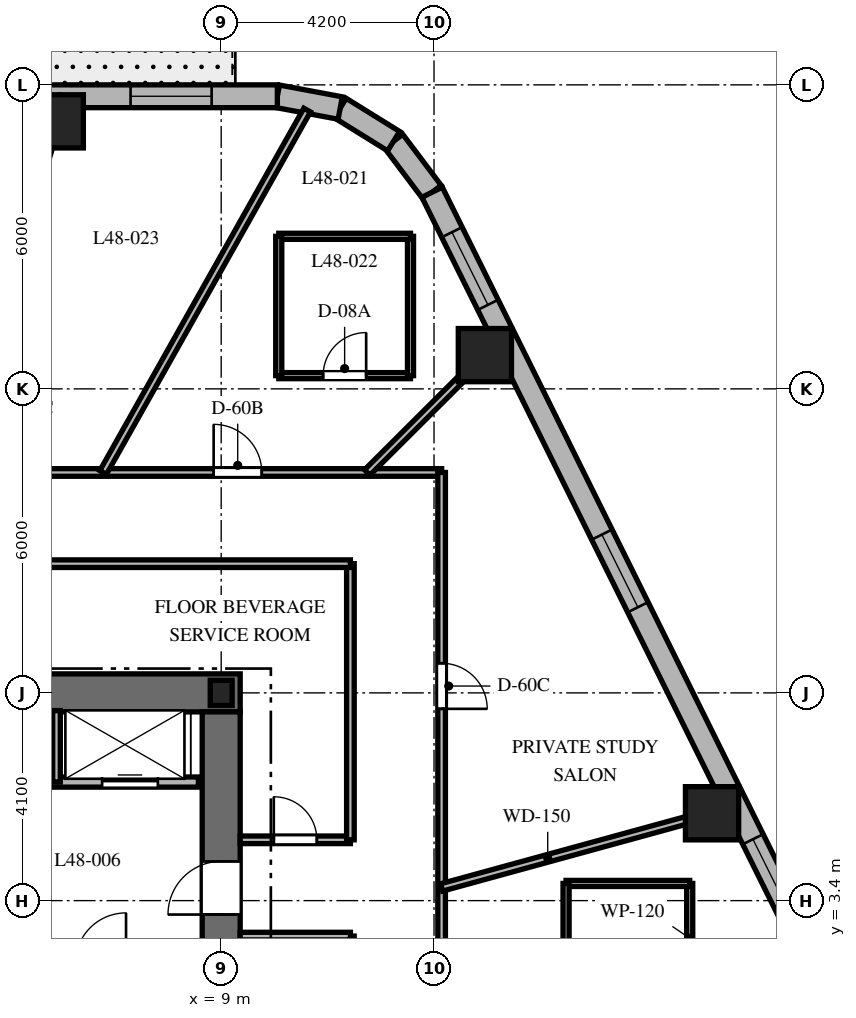
"""IFC4 building model, lengths in metres.
Left out: names, types, materials, properties, quantities, classifications, styles, units other than length and angle.
Written with IfcOpenShell. Run it as: python <this file> out.ifc"""

import sys

from ifc_helpers import new_model, si_unit, direction, frame, frame_2d, origin, origin_2d, place, context, subcontext, project, spatial, rectangle, i_section, extrude, element, fill, save


model = new_model("IFC4")
c1 = context("Model", 3, precision=1e-05, world=origin(), true_north=direction((0.0, 1.0)))
c2 = subcontext(c1, "Body", "Model", "MODEL_VIEW")
j1 = project(units=[si_unit("LENGTHUNIT", "METRE"), si_unit("PLANEANGLEUNIT", "RADIAN")], contexts=[c1])
p1 = place(None, origin())
s1 = spatial("IfcSite", under=j1, at=p1, CompositionType="ELEMENT")
p2 = place(p1, origin())
s2 = spatial("IfcBuilding", under=s1, at=p2, CompositionType="ELEMENT")
p3 = place(p2, frame((0.0, 0.0, 194.1)))
s3 = spatial("IfcBuildingStorey", under=s2, at=p3, CompositionType="ELEMENT", Elevation=194.1)
p4 = place(p3, frame((1.85, 7.5, 0.0), z_axis=(0.0, 0.0, 1.0), x_axis=(1.0, 0.0, 0.0)))
e1 = element("IfcWall", 1, at=p4, inside=s3, PredefinedType="SHEAR", context=c2, shape_type="SweptSolid", body=[
    extrude(rectangle(XDim=7.525, YDim=0.75, at=frame_2d((3.762, 0.0))), origin(), (0.0, 0.0, 1.0), 3.7),
])
p5 = place(p3, frame((9.0, -7.125, 0.0), z_axis=(0.0, 0.0, 1.0), x_axis=(0.0, 1.0, 0.0)))
e2 = element("IfcWall", 2, at=p5, inside=s3, PredefinedType="SHEAR", context=c2, shape_type="SweptSolid", body=[
    extrude(rectangle(XDim=14.25, YDim=0.75, at=frame_2d((7.125, 0.0))), origin(), (0.0, 0.0, 1.0), 3.7),
])
p6 = place(p5, frame((10.25, 0.0, 0.0)))
e3 = element("IfcOpeningElement", 3, at=p6, cuts=e2, PredefinedType="OPENING", context=c2, shape_type="SweptSolid", body=[
    extrude(rectangle(XDim=1.05, YDim=2.15, at=frame_2d((0.525, 1.075))), frame((0.0, 0.385, 0.0), z_axis=(0.0, -1.0, 0.0), x_axis=(1.0, 0.0, 0.0)), (0.0, 0.0, 1.0), 0.77),
])
p7 = place(p3, frame((9.0, 7.5, 0.0), z_axis=(0.0, 0.0, 1.0), x_axis=(1.0, 0.0, 0.0)))
e4 = element("IfcColumn", 4, at=p7, inside=s3, PredefinedType="COLUMN", context=c2, shape_type="SweptSolid", body=[
    extrude(i_section(OverallWidth=0.432, OverallDepth=0.498, WebThickness=0.056, FlangeThickness=0.089, at=origin_2d()), origin(), (0.0, 0.0, 1.0), 3.7),
])
for number, where, z_axis, x_axis in (
    (5, (18.687, 5.124, 0.0), (0.0, 0.0, 1.0), (1.0, 0.0, 0.0)),
    (6, (14.204, 14.166, 0.0), (0.0, 0.0, 1.0), (1.0, 0.0, 0.0)),
    (7, (5.755, 18.78, 0.0), (0.0, 0.0, 1.0), (1.0, 0.0, 0.0)),
):
    element("IfcColumn", number, at=place(p3, frame(where, z_axis=z_axis, x_axis=x_axis)), inside=s3, PredefinedType="COLUMN", context=c2, shape_type="SweptSolid", body=[
        extrude(rectangle(XDim=1.05, YDim=1.05, at=origin_2d()), origin(), (0.0, 0.0, 1.0), 3.7),
    ])
p8 = place(p3, frame((13.162, 17.381, 0.0), z_axis=(0.0, 0.0, 1.0), x_axis=(-0.601515770517, 0.798860925205, 0.0)))
e8 = element("IfcWall", 8, at=p8, inside=s3, PredefinedType="SOLIDWALL", context=c2, shape_type="SweptSolid", body=[
    extrude(rectangle(XDim=1.262, YDim=0.45, at=frame_2d((0.631, 0.0))), origin(), (0.0, 0.0, 1.0), 3.4),
])
p9 = place(p3, frame((12.403, 18.389, 0.0), z_axis=(0.0, 0.0, 1.0), x_axis=(-0.849795170926, 0.527113049991, 0.0)))
e9 = element("IfcWall", 9, at=p9, inside=s3, PredefinedType="SOLIDWALL", context=c2, shape_type="SweptSolid", body=[
    extrude(rectangle(XDim=1.241, YDim=0.45, at=frame_2d((0.62, 0.0))), origin(), (0.0, 0.0, 1.0), 3.4),
])
p10 = place(p3, frame((11.349, 19.043, 0.0), z_axis=(0.0, 0.0, 1.0), x_axis=(-0.982931267051, 0.183973161772, 0.0)))
e10 = element("IfcWall", 10, at=p10, inside=s3, PredefinedType="SOLIDWALL", context=c2, shape_type="SweptSolid", body=[
    extrude(rectangle(XDim=1.262, YDim=0.45, at=frame_2d((0.631, 0.0))), origin(), (0.0, 0.0, 1.0), 3.4),
])
p11 = place(p3, frame((20.618, 2.344, 0.0), z_axis=(0.0, 0.0, 1.0), x_axis=(-0.444243691097, 0.895905990002, 0.0)))
e11 = element("IfcWall", 11, at=p11, inside=s3, PredefinedType="SOLIDWALL", context=c2, shape_type="SweptSolid", body=[
    extrude(rectangle(XDim=16.784, YDim=0.45, at=frame_2d((8.392, 0.0))), origin(), (0.0, 0.0, 1.0), 3.4),
])
p12 = place(p11, frame((0.931, 0.0, 0.8)))
e12 = element("IfcOpeningElement", 12, at=p12, cuts=e11, PredefinedType="OPENING", context=c2, shape_type="SweptSolid", body=[
    extrude(rectangle(XDim=1.6, YDim=1.75, at=frame_2d((0.8, 0.875))), frame((0.0, 0.235, 0.0), z_axis=(0.0, -1.0, 0.0), x_axis=(1.0, 0.0, 0.0)), (0.0, 0.0, 1.0), 0.47),
])
p13 = place(p11, frame((7.642, 0.0, 0.8)))
e13 = element("IfcOpeningElement", 13, at=p13, cuts=e11, PredefinedType="OPENING", context=c2, shape_type="SweptSolid", body=[
    extrude(rectangle(XDim=1.6, YDim=1.75, at=frame_2d((0.8, 0.875))), frame((0.0, 0.235, 0.0), z_axis=(0.0, -1.0, 0.0), x_axis=(1.0, 0.0, 0.0)), (0.0, 0.0, 1.0), 0.47),
])
p14 = place(p11, frame((14.303, 0.0, 0.8)))
e14 = element("IfcOpeningElement", 14, at=p14, cuts=e11, PredefinedType="OPENING", context=c2, shape_type="SweptSolid", body=[
    extrude(rectangle(XDim=1.6, YDim=1.75, at=frame_2d((0.8, 0.875))), frame((0.0, 0.235, 0.0), z_axis=(0.0, -1.0, 0.0), x_axis=(1.0, 0.0, 0.0)), (0.0, 0.0, 1.0), 0.47),
])
p15 = place(p3, frame((10.108, 19.275, 0.0), z_axis=(0.0, 0.0, 1.0), x_axis=(-1.0, 0.0, 0.0)))
e15 = element("IfcWall", 15, at=p15, inside=s3, PredefinedType="SOLIDWALL", context=c2, shape_type="SweptSolid", body=[
    extrude(rectangle(XDim=21.829, YDim=0.45, at=frame_2d((10.915, 0.0))), origin(), (0.0, 0.0, 1.0), 3.4),
])
p16 = place(p15, frame((5.503, 0.0, 0.0)))
e16 = element("IfcOpeningElement", 16, at=p16, cuts=e15, PredefinedType="OPENING", context=c2, shape_type="SweptSolid", body=[
    extrude(rectangle(XDim=0.95, YDim=2.15, at=frame_2d((0.475, 1.075))), frame((0.0, 0.235, 0.0), z_axis=(0.0, -1.0, 0.0), x_axis=(1.0, 0.0, 0.0)), (0.0, 0.0, 1.0), 0.47),
])
p17 = place(p15, frame((1.297, 0.0, 0.8)))
e17 = element("IfcOpeningElement", 17, at=p17, cuts=e15, PredefinedType="OPENING", context=c2, shape_type="SweptSolid", body=[
    extrude(rectangle(XDim=1.6, YDim=1.75, at=frame_2d((0.8, 0.875))), frame((0.0, 0.235, 0.0), z_axis=(0.0, -1.0, 0.0), x_axis=(1.0, 0.0, 0.0)), (0.0, 0.0, 1.0), 0.47),
])
p18 = place(p15, frame((10.115, 0.0, 0.8)))
e18 = element("IfcOpeningElement", 18, at=p18, cuts=e15, PredefinedType="OPENING", context=c2, shape_type="SweptSolid", body=[
    extrude(rectangle(XDim=1.6, YDim=1.75, at=frame_2d((0.8, 0.875))), frame((0.0, 0.235, 0.0), z_axis=(0.0, -1.0, 0.0), x_axis=(1.0, 0.0, 0.0)), (0.0, 0.0, 1.0), 0.47),
])
p19 = place(p15, frame((18.933, 0.0, 0.8)))
e19 = element("IfcOpeningElement", 19, at=p19, cuts=e15, PredefinedType="OPENING", context=c2, shape_type="SweptSolid", body=[
    extrude(rectangle(XDim=1.6, YDim=1.75, at=frame_2d((0.8, 0.875))), frame((0.0, 0.235, 0.0), z_axis=(0.0, -1.0, 0.0), x_axis=(1.0, 0.0, 0.0)), (0.0, 0.0, 1.0), 0.47),
])
p20 = place(p3, frame((4.5, 5.74, 0.0), z_axis=(0.0, 0.0, 1.0), x_axis=(1.0, 0.0, 0.0)))
e20 = element("IfcWall", 20, at=p20, inside=s3, PredefinedType="PARTITIONING", context=c2, shape_type="SweptSolid", body=[
    extrude(rectangle(XDim=4.05, YDim=0.2, at=frame_2d((2.025, 0.0))), origin(), (0.0, 0.0, 1.0), 3.4),
])
p21 = place(p20, frame((0.3, 0.0, 0.0)))
e21 = element("IfcOpeningElement", 21, at=p21, cuts=e20, PredefinedType="OPENING", context=c2, shape_type="SweptSolid", body=[
    extrude(rectangle(XDim=0.85, YDim=2.03, at=frame_2d((0.425, 1.015))), frame((0.0, 0.11, 0.0), z_axis=(0.0, -1.0, 0.0), x_axis=(1.0, 0.0, 0.0)), (0.0, 0.0, 1.0), 0.22),
])
p22 = place(p20, frame((2.15, 0.0, 0.0)))
e22 = element("IfcOpeningElement", 22, at=p22, cuts=e20, PredefinedType="OPENING", context=c2, shape_type="SweptSolid", body=[
    extrude(rectangle(XDim=1.1, YDim=2.2, at=frame_2d((0.55, 1.1))), frame((0.0, 0.11, 0.0), z_axis=(0.0, -1.0, 0.0), x_axis=(1.0, 0.0, 0.0)), (0.0, 0.0, 1.0), 0.22),
])
p23 = place(p3, frame((5.75, 5.74, 0.0), z_axis=(0.0, 0.0, 1.0), x_axis=(0.0, 1.0, 0.0)))
e23 = element("IfcWall", 23, at=p23, inside=s3, PredefinedType="PARTITIONING", context=c2, shape_type="SweptSolid", body=[
    extrude(rectangle(XDim=1.41, YDim=0.15, at=frame_2d((0.705, 0.0))), origin(), (0.0, 0.0, 1.0), 3.4),
])
p24 = place(p3, frame((-13.35, 11.85, 0.0), z_axis=(0.0, 0.0, 1.0), x_axis=(1.0, 0.0, 0.0)))
e24 = element("IfcWall", 24, at=p24, inside=s3, PredefinedType="PARTITIONING", context=c2, shape_type="SweptSolid", body=[
    extrude(rectangle(XDim=26.7, YDim=0.15, at=frame_2d((13.35, 0.0))), origin(), (0.0, 0.0, 1.0), 2.84),
])
p25 = place(p24, frame((22.201, 0.0, 0.0)))
e25 = element("IfcOpeningElement", 25, at=p25, cuts=e24, PredefinedType="OPENING", context=c2, shape_type="SweptSolid", body=[
    extrude(rectangle(XDim=0.95, YDim=2.03, at=frame_2d((0.475, 1.015))), frame((0.0, 0.085, 0.0), z_axis=(0.0, -1.0, 0.0), x_axis=(1.0, 0.0, 0.0)), (0.0, 0.0, 1.0), 0.17),
])
p26 = place(p24, frame((18.069, 0.0, 0.0)))
e26 = element("IfcOpeningElement", 26, at=p26, cuts=e24, PredefinedType="OPENING", context=c2, shape_type="SweptSolid", body=[
    extrude(rectangle(XDim=0.9, YDim=2.03, at=frame_2d((0.45, 1.015))), frame((0.0, 0.085, 0.0), z_axis=(0.0, -1.0, 0.0), x_axis=(1.0, 0.0, 0.0)), (0.0, 0.0, 1.0), 0.17),
])
p27 = place(p24, frame((12.362, 0.0, 0.0)))
e27 = element("IfcOpeningElement", 27, at=p27, cuts=e24, PredefinedType="OPENING", context=c2, shape_type="SweptSolid", body=[
    extrude(rectangle(XDim=0.95, YDim=2.03, at=frame_2d((0.475, 1.015))), frame((0.0, 0.085, 0.0), z_axis=(0.0, -1.0, 0.0), x_axis=(1.0, 0.0, 0.0)), (0.0, 0.0, 1.0), 0.17),
])
p28 = place(p24, frame((3.995, 0.0, 0.0)))
e28 = element("IfcOpeningElement", 28, at=p28, cuts=e24, PredefinedType="OPENING", context=c2, shape_type="SweptSolid", body=[
    extrude(rectangle(XDim=0.95, YDim=2.03, at=frame_2d((0.475, 1.015))), frame((0.0, 0.085, 0.0), z_axis=(0.0, -1.0, 0.0), x_axis=(1.0, 0.0, 0.0)), (0.0, 0.0, 1.0), 0.17),
])
p29 = place(p3, frame((13.35, 11.85, 0.0), z_axis=(0.0, 0.0, 1.0), x_axis=(0.0, -1.0, 0.0)))
e29 = element("IfcWall", 29, at=p29, inside=s3, PredefinedType="PARTITIONING", context=c2, shape_type="SweptSolid", body=[
    extrude(rectangle(XDim=23.7, YDim=0.15, at=frame_2d((11.85, 0.0))), origin(), (0.0, 0.0, 1.0), 2.84),
])
p30 = place(p29, frame((9.424, 0.0, 0.0)))
e30 = element("IfcOpeningElement", 30, at=p30, cuts=e29, PredefinedType="OPENING", context=c2, shape_type="SweptSolid", body=[
    extrude(rectangle(XDim=0.95, YDim=2.03, at=frame_2d((0.475, 1.015))), frame((0.0, 0.085, 0.0), z_axis=(0.0, -1.0, 0.0), x_axis=(1.0, 0.0, 0.0)), (0.0, 0.0, 1.0), 0.17),
])
p31 = place(p29, frame((3.765, 0.0, 0.0)))
e31 = element("IfcOpeningElement", 31, at=p31, cuts=e29, PredefinedType="OPENING", context=c2, shape_type="SweptSolid", body=[
    extrude(rectangle(XDim=0.9, YDim=2.03, at=frame_2d((0.45, 1.015))), frame((0.0, 0.085, 0.0), z_axis=(0.0, -1.0, 0.0), x_axis=(1.0, 0.0, 0.0)), (0.0, 0.0, 1.0), 0.17),
])
p32 = place(p29, frame((12.494, 0.0, 0.0)))
e32 = element("IfcOpeningElement", 32, at=p32, cuts=e29, PredefinedType="OPENING", context=c2, shape_type="SweptSolid", body=[
    extrude(rectangle(XDim=0.9, YDim=2.03, at=frame_2d((0.45, 1.015))), frame((0.0, 0.085, 0.0), z_axis=(0.0, -1.0, 0.0), x_axis=(1.0, 0.0, 0.0)), (0.0, 0.0, 1.0), 0.17),
])
p33 = place(p3, frame((11.55, -10.05, 0.0), z_axis=(0.0, 0.0, 1.0), x_axis=(0.0, 1.0, 0.0)))
e33 = element("IfcWall", 33, at=p33, inside=s3, PredefinedType="PARTITIONING", context=c2, shape_type="SweptSolid", body=[
    extrude(rectangle(XDim=12.75, YDim=0.15, at=frame_2d((6.375, 0.0))), origin(), (0.0, 0.0, 1.0), 2.84),
])
p34 = place(p33, frame((5.95, 0.0, 0.0)))
e34 = element("IfcOpeningElement", 34, at=p34, cuts=e33, PredefinedType="OPENING", context=c2, shape_type="SweptSolid", body=[
    extrude(rectangle(XDim=0.85, YDim=2.03, at=frame_2d((0.425, 1.015))), frame((0.0, 0.085, 0.0), z_axis=(0.0, -1.0, 0.0), x_axis=(1.0, 0.0, 0.0)), (0.0, 0.0, 1.0), 0.17),
])
p35 = place(p3, frame((11.55, 2.7, 0.0), z_axis=(0.0, 0.0, 1.0), x_axis=(-1.0, 0.0, 0.0)))
e35 = element("IfcWall", 35, at=p35, inside=s3, PredefinedType="PARTITIONING", context=c2, shape_type="SweptSolid", body=[
    extrude(rectangle(XDim=2.175, YDim=0.15, at=frame_2d((1.087, 0.0))), origin(), (0.0, 0.0, 1.0), 3.4),
])
p36 = place(p3, frame((9.375, 4.6, 0.0), z_axis=(0.0, 0.0, 1.0), x_axis=(1.0, 0.0, 0.0)))
e36 = element("IfcWall", 36, at=p36, inside=s3, PredefinedType="PARTITIONING", context=c2, shape_type="SweptSolid", body=[
    extrude(rectangle(XDim=2.175, YDim=0.15, at=frame_2d((1.087, 0.0))), origin(), (0.0, 0.0, 1.0), 3.4),
])
p37 = place(p36, frame((0.663, 0.0, 0.0)))
e37 = element("IfcOpeningElement", 37, at=p37, cuts=e36, PredefinedType="OPENING", context=c2, shape_type="SweptSolid", body=[
    extrude(rectangle(XDim=0.85, YDim=2.03, at=frame_2d((0.425, 1.015))), frame((0.0, 0.085, 0.0), z_axis=(0.0, -1.0, 0.0), x_axis=(1.0, 0.0, 0.0)), (0.0, 0.0, 1.0), 0.17),
])
p38 = place(p3, frame((11.55, 4.6, 0.0), z_axis=(0.0, 0.0, 1.0), x_axis=(0.0, 1.0, 0.0)))
e38 = element("IfcWall", 38, at=p38, inside=s3, PredefinedType="PARTITIONING", context=c2, shape_type="SweptSolid", body=[
    extrude(rectangle(XDim=5.45, YDim=0.15, at=frame_2d((2.725, 0.0))), origin(), (0.0, 0.0, 1.0), 2.84),
])
p39 = place(p3, frame((11.55, 10.05, 0.0), z_axis=(0.0, 0.0, 1.0), x_axis=(-1.0, 0.0, 0.0)))
e39 = element("IfcWall", 39, at=p39, inside=s3, PredefinedType="PARTITIONING", context=c2, shape_type="SweptSolid", body=[
    extrude(rectangle(XDim=9.65, YDim=0.15, at=frame_2d((4.825, 0.0))), origin(), (0.0, 0.0, 1.0), 2.84),
])
p40 = place(p3, frame((13.35, 3.661, 0.0), z_axis=(0.0, 0.0, 1.0), x_axis=(0.964397145454, 0.264458211898, 0.0)))
e40 = element("IfcWall", 40, at=p40, inside=s3, PredefinedType="PARTITIONING", context=c2, shape_type="SweptSolid", body=[
    extrude(rectangle(XDim=6.039, YDim=0.15, at=frame_2d((3.019, 0.0))), origin(), (0.0, 0.0, 1.0), 2.64),
])
p41 = place(p3, frame((11.882, 11.85, 0.0), z_axis=(0.0, 0.0, 1.0), x_axis=(0.708037373639, 0.706174962407, 0.0)))
e41 = element("IfcWall", 41, at=p41, inside=s3, PredefinedType="PARTITIONING", context=c2, shape_type="SweptSolid", body=[
    extrude(rectangle(XDim=3.802, YDim=0.15, at=frame_2d((1.901, 0.0))), origin(), (0.0, 0.0, 1.0), 2.64),
])
p42 = place(p3, frame((6.67, 11.85, 0.0), z_axis=(0.0, 0.0, 1.0), x_axis=(0.490522493943, 0.871428530022, 0.0)))
e42 = element("IfcWall", 42, at=p42, inside=s3, PredefinedType="PARTITIONING", context=c2, shape_type="SweptSolid", body=[
    extrude(rectangle(XDim=8.207, YDim=0.15, at=frame_2d((4.104, 0.0))), origin(), (0.0, 0.0, 1.0), 2.64),
])
p43 = place(p3, frame((3.631, 11.85, 0.0), z_axis=(0.0, 0.0, 1.0), x_axis=(0.293007573338, 0.956110120209, 0.0)))
e43 = element("IfcWall", 43, at=p43, inside=s3, PredefinedType="PARTITIONING", context=c2, shape_type="SweptSolid", body=[
    extrude(rectangle(XDim=7.766, YDim=0.15, at=frame_2d((3.883, 0.0))), origin(), (0.0, 0.0, 1.0), 2.64),
])
p44 = place(p3, frame((18.246, 1.129, 0.0), z_axis=(0.0, 0.0, 1.0), x_axis=(0.0, 1.0, 0.0)))
e44 = element("IfcWall", 44, at=p44, inside=s3, PredefinedType="PARTITIONING", context=c2, shape_type="SweptSolid", body=[
    extrude(rectangle(XDim=2.61, YDim=0.12, at=frame_2d((1.305, 0.0))), origin(), (0.0, 0.0, 1.0), 3.4),
])
p45 = place(p3, frame((18.246, 3.739, 0.0), z_axis=(0.0, 0.0, 1.0), x_axis=(-1.0, 0.0, 0.0)))
e45 = element("IfcWall", 45, at=p45, inside=s3, PredefinedType="PARTITIONING", context=c2, shape_type="SweptSolid", body=[
    extrude(rectangle(XDim=2.44, YDim=0.12, at=frame_2d((1.22, 0.0))), origin(), (0.0, 0.0, 1.0), 3.4),
])
p46 = place(p3, frame((15.806, 3.739, 0.0), z_axis=(0.0, 0.0, 1.0), x_axis=(0.0, -1.0, 0.0)))
e46 = element("IfcWall", 46, at=p46, inside=s3, PredefinedType="PARTITIONING", context=c2, shape_type="SweptSolid", body=[
    extrude(rectangle(XDim=2.61, YDim=0.12, at=frame_2d((1.305, 0.0))), origin(), (0.0, 0.0, 1.0), 2.84),
])
p47 = place(p3, frame((10.136, 13.761, 0.0), z_axis=(0.0, 0.0, 1.0), x_axis=(1.0, 0.0, 0.0)))
e47 = element("IfcWall", 47, at=p47, inside=s3, PredefinedType="PARTITIONING", context=c2, shape_type="SweptSolid", body=[
    extrude(rectangle(XDim=2.6, YDim=0.12, at=frame_2d((1.3, 0.0))), origin(), (0.0, 0.0, 1.0), 3.4),
])
p48 = place(p47, frame((0.875, 0.0, 0.0)))
e48 = element("IfcOpeningElement", 48, at=p48, cuts=e47, PredefinedType="OPENING", context=c2, shape_type="SweptSolid", body=[
    extrude(rectangle(XDim=0.85, YDim=2.03, at=frame_2d((0.425, 1.015))), frame((0.0, 0.07, 0.0), z_axis=(0.0, -1.0, 0.0), x_axis=(1.0, 0.0, 0.0)), (0.0, 0.0, 1.0), 0.14),
])
p49 = place(p3, frame((12.736, 13.761, 0.0), z_axis=(0.0, 0.0, 1.0), x_axis=(0.0, 1.0, 0.0)))
e49 = element("IfcWall", 49, at=p49, inside=s3, PredefinedType="PARTITIONING", context=c2, shape_type="SweptSolid", body=[
    extrude(rectangle(XDim=2.75, YDim=0.12, at=frame_2d((1.375, 0.0))), origin(), (0.0, 0.0, 1.0), 2.64),
])
p50 = place(p3, frame((12.736, 16.511, 0.0), z_axis=(0.0, 0.0, 1.0), x_axis=(-1.0, 0.0, 0.0)))
e50 = element("IfcWall", 50, at=p50, inside=s3, PredefinedType="PARTITIONING", context=c2, shape_type="SweptSolid", body=[
    extrude(rectangle(XDim=2.6, YDim=0.12, at=frame_2d((1.3, 0.0))), origin(), (0.0, 0.0, 1.0), 2.64),
])
p51 = place(p3, frame((10.136, 16.511, 0.0), z_axis=(0.0, 0.0, 1.0), x_axis=(0.0, -1.0, 0.0)))
e51 = element("IfcWall", 51, at=p51, inside=s3, PredefinedType="PARTITIONING", context=c2, shape_type="SweptSolid", body=[
    extrude(rectangle(XDim=2.75, YDim=0.12, at=frame_2d((1.375, 0.0))), origin(), (0.0, 0.0, 1.0), 2.64),
])
p52 = place(p12, origin())
e52 = element("IfcWindow", 52, at=p52, inside=s3, PartitioningType="SINGLE_PANEL", PredefinedType="WINDOW", context=c2, shape_type="SweptSolid", body=[
    extrude(rectangle(XDim=1.6, YDim=1.75, at=frame_2d((0.8, 0.875))), frame((0.0, 0.03, 0.0), z_axis=(0.0, -1.0, 0.0), x_axis=(1.0, 0.0, 0.0)), (0.0, 0.0, 1.0), 0.06),
])
fill(e12, e52)
p53 = place(p13, origin())
e53 = element("IfcWindow", 53, at=p53, inside=s3, PartitioningType="SINGLE_PANEL", PredefinedType="WINDOW", context=c2, shape_type="SweptSolid", body=[
    extrude(rectangle(XDim=1.6, YDim=1.75, at=frame_2d((0.8, 0.875))), frame((0.0, 0.03, 0.0), z_axis=(0.0, -1.0, 0.0), x_axis=(1.0, 0.0, 0.0)), (0.0, 0.0, 1.0), 0.06),
])
fill(e13, e53)
p54 = place(p14, origin())
e54 = element("IfcWindow", 54, at=p54, inside=s3, PartitioningType="SINGLE_PANEL", PredefinedType="WINDOW", context=c2, shape_type="SweptSolid", body=[
    extrude(rectangle(XDim=1.6, YDim=1.75, at=frame_2d((0.8, 0.875))), frame((0.0, 0.03, 0.0), z_axis=(0.0, -1.0, 0.0), x_axis=(1.0, 0.0, 0.0)), (0.0, 0.0, 1.0), 0.06),
])
fill(e14, e54)
p55 = place(p17, origin())
e55 = element("IfcWindow", 55, at=p55, inside=s3, PartitioningType="SINGLE_PANEL", PredefinedType="WINDOW", context=c2, shape_type="SweptSolid", body=[
    extrude(rectangle(XDim=1.6, YDim=1.75, at=frame_2d((0.8, 0.875))), frame((0.0, 0.03, 0.0), z_axis=(0.0, -1.0, 0.0), x_axis=(1.0, 0.0, 0.0)), (0.0, 0.0, 1.0), 0.06),
])
fill(e17, e55)
p56 = place(p6, origin())
e56 = element("IfcDoor", 56, at=p56, inside=s3, OperationType="SINGLE_SWING_LEFT", PredefinedType="DOOR", context=c2, shape_type="SweptSolid", body=[
    extrude(rectangle(XDim=1.05, YDim=2.15, at=frame_2d((0.525, 1.075))), frame((0.0, 0.025, 0.0), z_axis=(0.0, -1.0, 0.0), x_axis=(1.0, 0.0, 0.0)), (0.0, 0.0, 1.0), 0.05),
])
fill(e3, e56)
p57 = place(p22, origin())
e57 = element("IfcDoor", 57, at=p57, inside=s3, OperationType="SLIDING_TO_RIGHT", PredefinedType="DOOR", context=c2, shape_type="SweptSolid", body=[
    extrude(rectangle(XDim=1.1, YDim=2.2, at=frame_2d((0.55, 1.1))), frame((0.0, 0.025, 0.0), z_axis=(0.0, -1.0, 0.0), x_axis=(1.0, 0.0, 0.0)), (0.0, 0.0, 1.0), 0.05),
])
fill(e22, e57)
p58 = place(p37, origin())
e58 = element("IfcDoor", 58, at=p58, inside=s3, OperationType="SINGLE_SWING_LEFT", PredefinedType="DOOR", context=c2, shape_type="SweptSolid", body=[
    extrude(rectangle(XDim=0.85, YDim=2.03, at=frame_2d((0.425, 1.015))), frame((0.0, 0.025, 0.0), z_axis=(0.0, -1.0, 0.0), x_axis=(1.0, 0.0, 0.0)), (0.0, 0.0, 1.0), 0.05),
])
fill(e37, e58)
p59 = place(p31, origin())
e59 = element("IfcDoor", 59, at=p59, inside=s3, OperationType="SINGLE_SWING_RIGHT", PredefinedType="DOOR", context=c2, shape_type="SweptSolid", body=[
    extrude(rectangle(XDim=0.9, YDim=2.03, at=frame_2d((0.45, 1.015))), frame((0.0, 0.025, 0.0), z_axis=(0.0, -1.0, 0.0), x_axis=(1.0, 0.0, 0.0)), (0.0, 0.0, 1.0), 0.05),
])
fill(e31, e59)
p60 = place(p25, origin())
e60 = element("IfcDoor", 60, at=p60, inside=s3, OperationType="SINGLE_SWING_LEFT", PredefinedType="DOOR", context=c2, shape_type="SweptSolid", body=[
    extrude(rectangle(XDim=0.95, YDim=2.03, at=frame_2d((0.475, 1.015))), frame((0.0, 0.025, 0.0), z_axis=(0.0, -1.0, 0.0), x_axis=(1.0, 0.0, 0.0)), (0.0, 0.0, 1.0), 0.05),
])
fill(e25, e60)
p61 = place(p48, origin())
e61 = element("IfcDoor", 61, at=p61, inside=s3, OperationType="SINGLE_SWING_RIGHT", PredefinedType="DOOR", context=c2, shape_type="SweptSolid", body=[
    extrude(rectangle(XDim=0.85, YDim=2.03, at=frame_2d((0.425, 1.015))), frame((0.0, 0.025, 0.0), z_axis=(0.0, -1.0, 0.0), x_axis=(1.0, 0.0, 0.0)), (0.0, 0.0, 1.0), 0.05),
])
fill(e48, e61)
save(model, sys.argv[1])
